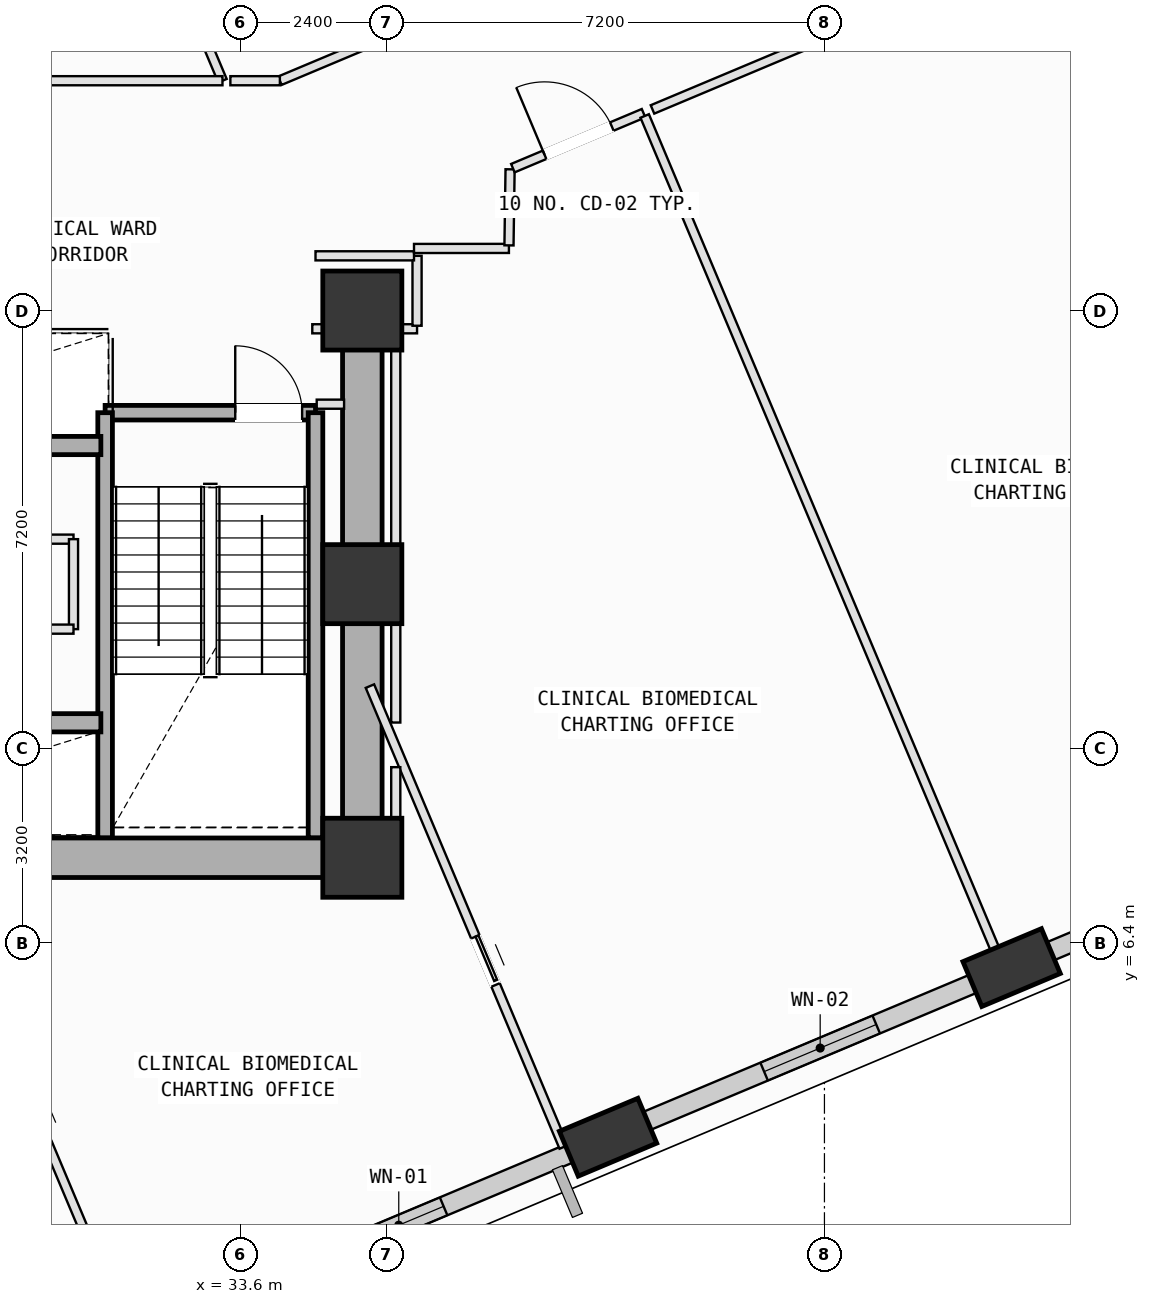
"""IFC4 building model, lengths in metres.
Left out: names, types, materials, properties, quantities, classifications, styles, units other than length and angle.
Written with IfcOpenShell. Run it as: python <this file> out.ifc"""

import sys

from ifc_helpers import new_model, si_unit, direction, frame, frame_2d, origin, origin_2d, place, context, subcontext, project, spatial, rectangle, extrude, element, fill, save


model = new_model("IFC4")
c1 = context("Model", 3, precision=1e-05, world=origin(), true_north=direction((0.0, 1.0)))
c2 = subcontext(c1, "Body", "Model", "MODEL_VIEW")
j1 = project(units=[si_unit("LENGTHUNIT", "METRE"), si_unit("PLANEANGLEUNIT", "RADIAN")], contexts=[c1])
p1 = place(None, origin())
s1 = spatial("IfcSite", under=j1, at=p1, CompositionType="ELEMENT")
p2 = place(p1, origin())
s2 = spatial("IfcBuilding", under=s1, at=p2, CompositionType="ELEMENT")
p3 = place(p2, frame((0.0, 0.0, 120.4)))
s3 = spatial("IfcBuildingStorey", under=s2, at=p3, CompositionType="ELEMENT", Elevation=120.4)
for number, where, z_axis, x_axis in (
    (1, (35.6, 7.8, 0.0), (0.0, 0.0, 1.0), (1.0, 0.0, 0.0)),
    (2, (35.6, 12.3, 0.0), (0.0, 0.0, 1.0), (1.0, 0.0, 0.0)),
    (3, (35.6, 16.8, 0.0), (0.0, 0.0, 1.0), (1.0, 0.0, 0.0)),
):
    element("IfcColumn", number, at=place(p3, frame(where, z_axis=z_axis, x_axis=x_axis)), inside=s3, PredefinedType="COLUMN", context=c2, shape_type="SweptSolid", body=[
        extrude(rectangle(XDim=1.3, YDim=1.3, at=origin_2d()), origin(), (0.0, 0.0, 1.0), 4.0),
    ])
p4 = place(p3, frame((39.641, 3.204, 0.002), z_axis=(0.08893172908, 0.025669760377, 0.995706890086), x_axis=(-0.626372223707, 0.778698418388, 0.035869354176)))
e4 = element("IfcColumn", 4, at=p4, inside=s3, PredefinedType="COLUMN", context=c2, shape_type="SweptSolid", body=[
    extrude(rectangle(XDim=1.4, YDim=0.8, at=origin_2d()), origin(), (0.0, 0.0, 1.0), 4.014),
])
p5 = place(p3, frame((46.279, 5.994, 0.002), z_axis=(0.077184132072, 0.052976658026, 0.995608398649), x_axis=(-0.83977209716, 0.541725725919, 0.036277578595)))
e5 = element("IfcColumn", 5, at=p5, inside=s3, PredefinedType="COLUMN", context=c2, shape_type="SweptSolid", body=[
    extrude(rectangle(XDim=1.4, YDim=0.8, at=origin_2d()), origin(), (0.0, 0.0, 1.0), 4.014),
])
p6 = place(p3, frame((39.354, 3.083, 0.0), z_axis=(0.0, 0.0, 1.0), x_axis=(-0.921860032261, -0.387523006956, 0.0)))
e6 = element("IfcWall", 6, at=p6, inside=s3, PredefinedType="SOLIDWALL", context=c2, shape_type="SweptSolid", body=[
    extrude(rectangle(XDim=6.214, YDim=0.32, at=frame_2d((3.107, 0.0))), origin(), (0.0, 0.0, 1.0), 3.165),
])
p7 = place(p6, frame((2.622, 0.0, 0.75)))
e7 = element("IfcOpeningElement", 7, at=p7, cuts=e6, PredefinedType="OPENING", context=c2, shape_type="SweptSolid", body=[
    extrude(rectangle(XDim=1.6, YDim=1.95, at=frame_2d((0.8, 0.975))), frame((0.0, 0.17, 0.0), z_axis=(0.0, -1.0, 0.0), x_axis=(1.0, 0.0, 0.0)), (0.0, 0.0, 1.0), 0.34),
])
p8 = place(p3, frame((45.992, 5.873, 0.0), z_axis=(0.0, 0.0, 1.0), x_axis=(-0.921868356039, -0.387503205321, 0.0)))
e8 = element("IfcWall", 8, at=p8, inside=s3, PredefinedType="SOLIDWALL", context=c2, shape_type="SweptSolid", body=[
    extrude(rectangle(XDim=6.209, YDim=0.32, at=frame_2d((3.104, 0.0))), origin(), (0.0, 0.0, 1.0), 3.165),
])
p9 = place(p8, frame((2.105, 0.0, 0.75)))
e9 = element("IfcOpeningElement", 9, at=p9, cuts=e8, PredefinedType="OPENING", context=c2, shape_type="SweptSolid", body=[
    extrude(rectangle(XDim=2.0, YDim=1.95, at=frame_2d((1.0, 0.975))), frame((0.0, 0.17, 0.0), z_axis=(0.0, -1.0, 0.0), x_axis=(1.0, 0.0, 0.0)), (0.0, 0.0, 1.0), 0.34),
])
p10 = place(p3, frame((52.637, 8.667, 0.0), z_axis=(0.0, 0.0, 1.0), x_axis=(-0.921850291978, -0.387546176836, 0.0)))
e10 = element("IfcWall", 10, at=p10, inside=s3, PredefinedType="SOLIDWALL", context=c2, shape_type="SweptSolid", body=[
    extrude(rectangle(XDim=6.219, YDim=0.32, at=frame_2d((3.109, 0.0))), origin(), (0.0, 0.0, 1.0), 3.165),
])
p11 = place(p10, frame((2.411, 0.0, 0.75)))
e11 = element("IfcOpeningElement", 11, at=p11, cuts=e10, PredefinedType="OPENING", context=c2, shape_type="SweptSolid", body=[
    extrude(rectangle(XDim=1.4, YDim=1.85, at=frame_2d((0.7, 0.925))), frame((0.0, 0.17, 0.0), z_axis=(0.0, -1.0, 0.0), x_axis=(1.0, 0.0, 0.0)), (0.0, 0.0, 1.0), 0.34),
])
p12 = place(p3, frame((31.37, 15.12, 0.0), z_axis=(0.0, 0.0, 1.0), x_axis=(1.0, 0.0, 0.0)))
e12 = element("IfcWall", 12, at=p12, inside=s3, PredefinedType="SOLIDWALL", context=c2, shape_type="SweptSolid", body=[
    extrude(rectangle(XDim=3.46, YDim=0.24, at=frame_2d((1.73, 0.0))), origin(), (0.0, 0.0, 1.0), 3.78),
])
p13 = place(p12, frame((2.14, 0.0, 0.0)))
e13 = element("IfcOpeningElement", 13, at=p13, cuts=e12, PredefinedType="OPENING", context=c2, shape_type="SweptSolid", body=[
    extrude(rectangle(XDim=1.1, YDim=2.15, at=frame_2d((0.55, 1.075))), frame((0.0, 0.13, 0.0), z_axis=(0.0, -1.0, 0.0), x_axis=(1.0, 0.0, 0.0)), (0.0, 0.0, 1.0), 0.26),
])
for number, where, z_axis, x_axis in (
    (14, (34.83, 15.12, 0.0), (0.0, 0.0, 1.0), (0.0, -1.0, 0.0)),
    (15, (31.37, 8.125, 0.0), (0.0, 0.0, 1.0), (0.0, 1.0, 0.0)),
):
    element("IfcWall", number, at=place(p3, frame(where, z_axis=z_axis, x_axis=x_axis)), inside=s3, PredefinedType="SOLIDWALL", context=c2, shape_type="SweptSolid", body=[
        extrude(rectangle(XDim=6.995, YDim=0.24, at=frame_2d((3.498, 0.0))), origin(), (0.0, 0.0, 1.0), 3.78),
    ])
p14 = place(p3, frame((24.8, 7.8, 0.0), z_axis=(0.0, 0.0, 1.0), x_axis=(1.0, 0.0, 0.0)))
e16 = element("IfcWall", 16, at=p14, inside=s3, PredefinedType="SHEAR", context=c2, shape_type="SweptSolid", body=[
    extrude(rectangle(XDim=10.8, YDim=0.65, at=frame_2d((5.4, 0.0))), origin(), (0.0, 0.0, 1.0), 3.78),
])
p15 = place(p3, frame((35.6, 7.8, 0.0), z_axis=(0.0, 0.0, 1.0), x_axis=(0.0, 1.0, 0.0)))
e17 = element("IfcWall", 17, at=p15, inside=s3, PredefinedType="SHEAR", context=c2, shape_type="SweptSolid", body=[
    extrude(rectangle(XDim=9.0, YDim=0.65, at=frame_2d((4.5, 0.0))), origin(), (0.0, 0.0, 1.0), 3.78),
])
p16 = place(p3, frame((25.85, 10.02, 0.0), z_axis=(0.0, 0.0, 1.0), x_axis=(1.0, 0.0, 0.0)))
e18 = element("IfcWall", 18, at=p16, inside=s3, PredefinedType="SOLIDWALL", context=c2, shape_type="SweptSolid", body=[
    extrude(rectangle(XDim=5.45, YDim=0.3, at=frame_2d((2.725, 0.0))), origin(), (0.0, 0.0, 1.0), 3.78),
])
p17 = place(p16, frame((0.34, 0.0, 0.0)))
e19 = element("IfcOpeningElement", 19, at=p17, cuts=e18, PredefinedType="OPENING", context=c2, shape_type="SweptSolid", body=[
    extrude(rectangle(XDim=1.12, YDim=2.15, at=frame_2d((0.56, 1.075))), frame((0.0, 0.16, 0.0), z_axis=(0.0, -1.0, 0.0), x_axis=(1.0, 0.0, 0.0)), (0.0, 0.0, 1.0), 0.32),
])
p18 = place(p16, frame((2.24, 0.0, 0.0)))
e20 = element("IfcOpeningElement", 20, at=p18, cuts=e18, PredefinedType="OPENING", context=c2, shape_type="SweptSolid", body=[
    extrude(rectangle(XDim=1.12, YDim=2.15, at=frame_2d((0.56, 1.075))), frame((0.0, 0.16, 0.0), z_axis=(0.0, -1.0, 0.0), x_axis=(1.0, 0.0, 0.0)), (0.0, 0.0, 1.0), 0.32),
])
p19 = place(p3, frame((25.85, 14.58, 0.0), z_axis=(0.0, 0.0, 1.0), x_axis=(1.0, 0.0, 0.0)))
e21 = element("IfcWall", 21, at=p19, inside=s3, PredefinedType="SOLIDWALL", context=c2, shape_type="SweptSolid", body=[
    extrude(rectangle(XDim=5.45, YDim=0.3, at=frame_2d((2.725, 0.0))), origin(), (0.0, 0.0, 1.0), 3.78),
])
p20 = place(p3, frame((26.45, 13.04, 0.0), z_axis=(0.0, 0.0, 1.0), x_axis=(1.0, 0.0, 0.0)))
e22 = element("IfcWall", 22, at=p20, inside=s3, PredefinedType="PARTITIONING", context=c2, shape_type="SweptSolid", body=[
    extrude(rectangle(XDim=4.4, YDim=0.15, at=frame_2d((2.2, 0.0))), origin(), (0.0, 0.0, 1.0), 3.78),
])
p21 = place(p20, frame((1.74, 0.0, 0.0)))
e23 = element("IfcOpeningElement", 23, at=p21, cuts=e22, PredefinedType="OPENING", context=c2, shape_type="SweptSolid", body=[
    extrude(rectangle(XDim=0.92, YDim=2.1, at=frame_2d((0.46, 1.05))), frame((0.0, 0.085, 0.0), z_axis=(0.0, -1.0, 0.0), x_axis=(1.0, 0.0, 0.0)), (0.0, 0.0, 1.0), 0.17),
])
p22 = place(p3, frame((30.85, 13.04, 0.0), z_axis=(0.0, 0.0, 1.0), x_axis=(0.0, -1.0, 0.0)))
e24 = element("IfcWall", 24, at=p22, inside=s3, PredefinedType="PARTITIONING", context=c2, shape_type="SweptSolid", body=[
    extrude(rectangle(XDim=1.48, YDim=0.15, at=frame_2d((0.74, 0.0))), origin(), (0.0, 0.0, 1.0), 3.78),
])
p23 = place(p3, frame((30.85, 11.56, 0.0), z_axis=(0.0, 0.0, 1.0), x_axis=(-1.0, 0.0, 0.0)))
e25 = element("IfcWall", 25, at=p23, inside=s3, PredefinedType="PARTITIONING", context=c2, shape_type="SweptSolid", body=[
    extrude(rectangle(XDim=4.4, YDim=0.15, at=frame_2d((2.2, 0.0))), origin(), (0.0, 0.0, 1.0), 3.78),
])
p24 = place(p3, frame((28.512, 7.653, 0.0), z_axis=(0.0, 0.0, 1.0), x_axis=(0.387539276189, -0.921853192982, 0.0)))
e26 = element("IfcWall", 26, at=p24, inside=s3, PredefinedType="PARTITIONING", context=c2, shape_type="SweptSolid", body=[
    extrude(rectangle(XDim=8.645, YDim=0.15, at=frame_2d((4.322, 0.0))), origin(), (0.0, 0.0, 1.0), 3.78),
])
p25 = place(p24, frame((4.055, 0.0, 0.0)))
e27 = element("IfcOpeningElement", 27, at=p25, cuts=e26, PredefinedType="OPENING", context=c2, shape_type="SweptSolid", body=[
    extrude(rectangle(XDim=0.86, YDim=2.06, at=frame_2d((0.43, 1.03))), frame((0.0, 0.085, 0.0), z_axis=(0.0, -1.0, 0.0), x_axis=(1.0, 0.0, 0.0)), (0.0, 0.0, 1.0), 0.17),
])
p26 = place(p3, frame((35.725, 10.623, 0.0), z_axis=(0.0, 0.0, 1.0), x_axis=(0.387581758341, -0.921835332693, 0.0)))
e28 = element("IfcWall", 28, at=p26, inside=s3, PredefinedType="PARTITIONING", context=c2, shape_type="SweptSolid", body=[
    extrude(rectangle(XDim=8.223, YDim=0.15, at=frame_2d((4.111, 0.0))), origin(), (0.0, 0.0, 1.0), 3.78),
])
p27 = place(p26, frame((4.472, 0.0, 0.0)))
e29 = element("IfcOpeningElement", 29, at=p27, cuts=e28, PredefinedType="OPENING", context=c2, shape_type="SweptSolid", body=[
    extrude(rectangle(XDim=0.86, YDim=2.06, at=frame_2d((0.43, 1.03))), frame((0.0, 0.085, 0.0), z_axis=(0.0, -1.0, 0.0), x_axis=(1.0, 0.0, 0.0)), (0.0, 0.0, 1.0), 0.17),
])
p28 = place(p3, frame((35.6, 7.5, 0.0), z_axis=(0.0, 0.0, 1.0), x_axis=(1.0, 0.0, 0.0)))
e30 = element("IfcWall", 30, at=p28, inside=s3, PredefinedType="PARTITIONING", context=c2, shape_type="SweptSolid", body=[
    extrude(rectangle(XDim=0.55, YDim=0.15, at=frame_2d((0.275, 0.0))), origin(), (0.0, 0.0, 1.0), 2.965),
])
p29 = place(p3, frame((36.15, 7.5, 0.0), z_axis=(0.0, 0.0, 1.0), x_axis=(0.0, 1.0, 0.0)))
e31 = element("IfcWall", 31, at=p29, inside=s3, PredefinedType="PARTITIONING", context=c2, shape_type="SweptSolid", body=[
    extrude(rectangle(XDim=1.79, YDim=0.15, at=frame_2d((0.895, 0.0))), origin(), (0.0, 0.0, 1.0), 3.78),
])
p30 = place(p3, frame((34.777, 16.5, 0.0), z_axis=(0.0, 0.0, 1.0), x_axis=(1.0, 0.0, 0.0)))
e32 = element("IfcWall", 32, at=p30, inside=s3, PredefinedType="PARTITIONING", context=c2, shape_type="SweptSolid", body=[
    extrude(rectangle(XDim=0.523, YDim=0.15, at=frame_2d((0.261, 0.0))), origin(), (0.0, 0.0, 1.0), 2.965),
])
p31 = place(p3, frame((35.9, 16.5, 0.0), z_axis=(0.0, 0.0, 1.0), x_axis=(1.0, 0.0, 0.0)))
e33 = element("IfcWall", 33, at=p31, inside=s3, PredefinedType="PARTITIONING", context=c2, shape_type="SweptSolid", body=[
    extrude(rectangle(XDim=0.6, YDim=0.15, at=frame_2d((0.3, 0.0))), origin(), (0.0, 0.0, 1.0), 2.965),
])
p32 = place(p3, frame((36.5, 16.55, 0.0), z_axis=(0.0, 0.0, 1.0), x_axis=(0.0, 1.0, 0.0)))
e34 = element("IfcWall", 34, at=p32, inside=s3, PredefinedType="PARTITIONING", context=c2, shape_type="SweptSolid", body=[
    extrude(rectangle(XDim=1.15, YDim=0.15, at=frame_2d((0.575, 0.0))), origin(), (0.0, 0.0, 1.0), 3.78),
])
p33 = place(p3, frame((36.45, 17.7, 0.0), z_axis=(0.0, 0.0, 1.0), x_axis=(-1.0, 0.0, 0.0)))
e35 = element("IfcWall", 35, at=p33, inside=s3, PredefinedType="PARTITIONING", context=c2, shape_type="SweptSolid", body=[
    extrude(rectangle(XDim=1.62, YDim=0.15, at=frame_2d((0.81, 0.0))), origin(), (0.0, 0.0, 1.0), 3.78),
])
p34 = place(p3, frame((36.45, 17.821, 0.0), z_axis=(0.0, 0.0, 1.0), x_axis=(0.999999804321, 0.000625586365, 0.0)))
e36 = element("IfcWall", 36, at=p34, inside=s3, PredefinedType="PARTITIONING", context=c2, shape_type="SweptSolid", body=[
    extrude(rectangle(XDim=1.561, YDim=0.15, at=frame_2d((0.781, 0.0))), origin(), (0.0, 0.0, 1.0), 2.965),
])
p35 = place(p3, frame((38.012, 17.872, 0.0), z_axis=(0.0, 0.0, 1.0), x_axis=(0.014440336502, 0.999895732905, 0.0)))
e37 = element("IfcWall", 37, at=p35, inside=s3, PredefinedType="PARTITIONING", context=c2, shape_type="SweptSolid", body=[
    extrude(rectangle(XDim=1.251, YDim=0.15, at=frame_2d((0.625, 0.0))), origin(), (0.0, 0.0, 1.0), 3.78),
])
p36 = place(p3, frame((38.076, 19.142, 0.0), z_axis=(0.0, 0.0, 1.0), x_axis=(0.921804802064, 0.387654365244, 0.0)))
e38 = element("IfcWall", 38, at=p36, inside=s3, PredefinedType="PARTITIONING", context=c2, shape_type="SweptSolid", body=[
    extrude(rectangle(XDim=2.332, YDim=0.15, at=frame_2d((1.166, 0.0))), origin(), (0.0, 0.0, 1.0), 2.945),
])
p37 = place(p36, frame((0.566, 0.0, 0.0)))
e39 = element("IfcOpeningElement", 39, at=p37, cuts=e38, PredefinedType="OPENING", context=c2, shape_type="SweptSolid", body=[
    extrude(rectangle(XDim=1.2, YDim=2.15, at=frame_2d((0.6, 1.075))), frame((0.0, 0.085, 0.0), z_axis=(0.0, -1.0, 0.0), x_axis=(1.0, 0.0, 0.0)), (0.0, 0.0, 1.0), 0.17),
])
p38 = place(p3, frame((40.244, 20.0, 0.0), z_axis=(0.0, 0.0, 1.0), x_axis=(0.387518279995, -0.921862019323, 0.0)))
e40 = element("IfcWall", 40, at=p38, inside=s3, PredefinedType="PARTITIONING", context=c2, shape_type="SweptSolid", body=[
    extrude(rectangle(XDim=15.481, YDim=0.15, at=frame_2d((7.74, 0.0))), origin(), (0.0, 0.0, 1.0), 3.78),
])
p39 = place(p3, frame((40.357, 3.255, 0.0), z_axis=(0.0, 0.0, 1.0), x_axis=(-0.921987382079, -0.387219921087, 0.0)))
e41 = element("IfcWall", 41, at=p39, inside=s3, PredefinedType="PARTITIONING", context=c2, shape_type="SweptSolid", body=[
    extrude(rectangle(XDim=0.991, YDim=0.15, at=frame_2d((0.496, 0.0))), origin(), (0.0, 0.0, 1.0), 3.165),
])
p40 = place(p3, frame((36.15, 10.024, 0.0), z_axis=(0.0, 0.0, 1.0), x_axis=(0.0, 1.0, 0.0)))
e42 = element("IfcWall", 42, at=p40, inside=s3, PredefinedType="PARTITIONING", context=c2, shape_type="SweptSolid", body=[
    extrude(rectangle(XDim=6.316, YDim=0.15, at=frame_2d((3.158, 0.0))), origin(), (0.0, 0.0, 1.0), 3.78),
])
p41 = place(p3, frame((35.3, 15.26, 0.0), z_axis=(0.0, 0.0, 1.0), x_axis=(-1.0, 0.0, 0.0)))
e43 = element("IfcWall", 43, at=p41, inside=s3, PredefinedType="PARTITIONING", context=c2, shape_type="SweptSolid", body=[
    extrude(rectangle(XDim=0.45, YDim=0.15, at=frame_2d((0.225, 0.0))), origin(), (0.0, 0.0, 1.0), 3.78),
])
p42 = place(p3, frame((40.372, 20.108, 0.0), z_axis=(0.0, 0.0, 1.0), x_axis=(0.921900405163, 0.387426951774, 0.0)))
e44 = element("IfcWall", 44, at=p42, inside=s3, PredefinedType="PARTITIONING", context=c2, shape_type="SweptSolid", body=[
    extrude(rectangle(XDim=7.641, YDim=0.15, at=frame_2d((3.82, 0.0))), origin(), (0.0, 0.0, 1.0), 3.78),
])
p43 = place(p42, frame((3.22, 0.0, 0.0)))
e45 = element("IfcOpeningElement", 45, at=p43, cuts=e44, PredefinedType="OPENING", context=c2, shape_type="SweptSolid", body=[
    extrude(rectangle(XDim=1.2, YDim=2.15, at=frame_2d((0.6, 1.075))), frame((0.0, 0.085, 0.0), z_axis=(0.0, -1.0, 0.0), x_axis=(1.0, 0.0, 0.0)), (0.0, 0.0, 1.0), 0.17),
])
p44 = place(p3, frame((46.994, 6.044, 0.0), z_axis=(0.0, 0.0, 1.0), x_axis=(-0.922112725335, -0.386921337969, 0.0)))
e46 = element("IfcWall", 46, at=p44, inside=s3, PredefinedType="PARTITIONING", context=c2, shape_type="SweptSolid", body=[
    extrude(rectangle(XDim=0.654, YDim=0.15, at=frame_2d((0.327, 0.0))), origin(), (0.0, 0.0, 1.0), 3.165),
])
p45 = place(p3, frame((32.413, 22.69, 0.0), z_axis=(0.0, 0.0, 1.0), x_axis=(0.387537134963, -0.921854093132, 0.0)))
e47 = element("IfcWall", 47, at=p45, inside=s3, PredefinedType="PARTITIONING", context=c2, shape_type="SweptSolid", body=[
    extrude(rectangle(XDim=2.289, YDim=0.15, at=frame_2d((1.145, 0.0))), origin(), (0.0, 0.0, 1.0), 3.78),
])
p46 = place(p3, frame((33.3, 20.58, 0.0), z_axis=(0.0, 0.0, 1.0), x_axis=(-1.0, 0.0, 0.0)))
e48 = element("IfcWall", 48, at=p46, inside=s3, PredefinedType="PARTITIONING", context=c2, shape_type="SweptSolid", body=[
    extrude(rectangle(XDim=4.495, YDim=0.15, at=frame_2d((2.248, 0.0))), origin(), (0.0, 0.0, 1.0), 3.78),
])
p47 = place(p3, frame((44.851, 25.038, 0.0), z_axis=(0.0, 0.0, 1.0), x_axis=(-0.921889203051, -0.38745360664, 0.0)))
e49 = element("IfcWall", 49, at=p47, inside=s3, PredefinedType="PARTITIONING", context=c2, shape_type="SweptSolid", body=[
    extrude(rectangle(XDim=11.506, YDim=0.15, at=frame_2d((5.753, 0.0))), origin(), (0.0, 0.0, 1.0), 2.945),
])
p48 = place(p47, frame((5.153, 0.0, 0.0)))
e50 = element("IfcOpeningElement", 50, at=p48, cuts=e49, PredefinedType="OPENING", context=c2, shape_type="SweptSolid", body=[
    extrude(rectangle(XDim=1.2, YDim=2.15, at=frame_2d((0.6, 1.075))), frame((0.0, 0.085, 0.0), z_axis=(0.0, -1.0, 0.0), x_axis=(1.0, 0.0, 0.0)), (0.0, 0.0, 1.0), 0.17),
])
p49 = place(p3, frame((34.244, 20.58, 0.0), z_axis=(0.0, 0.0, 1.0), x_axis=(-1.0, 0.0, 0.0)))
e51 = element("IfcWall", 51, at=p49, inside=s3, PredefinedType="PARTITIONING", context=c2, shape_type="SweptSolid", body=[
    extrude(rectangle(XDim=0.814, YDim=0.15, at=frame_2d((0.407, 0.0))), origin(), (0.0, 0.0, 1.0), 3.78),
])
p50 = place(p7, origin())
e52 = element("IfcWindow", 52, at=p50, inside=s3, PartitioningType="SINGLE_PANEL", PredefinedType="WINDOW", context=c2, shape_type="SweptSolid", body=[
    extrude(rectangle(XDim=1.6, YDim=1.95, at=frame_2d((0.8, 0.975))), frame((0.0, 0.03, 0.0), z_axis=(0.0, -1.0, 0.0), x_axis=(1.0, 0.0, 0.0)), (0.0, 0.0, 1.0), 0.06),
])
fill(e7, e52)
p51 = place(p9, origin())
e53 = element("IfcWindow", 53, at=p51, inside=s3, PartitioningType="SINGLE_PANEL", PredefinedType="WINDOW", context=c2, shape_type="SweptSolid", body=[
    extrude(rectangle(XDim=2.0, YDim=1.95, at=frame_2d((1.0, 0.975))), frame((0.0, 0.03, 0.0), z_axis=(0.0, -1.0, 0.0), x_axis=(1.0, 0.0, 0.0)), (0.0, 0.0, 1.0), 0.06),
])
fill(e9, e53)
p52 = place(p13, origin())
e54 = element("IfcDoor", 54, at=p52, inside=s3, OperationType="SINGLE_SWING_LEFT", PredefinedType="DOOR", context=c2, shape_type="SweptSolid", body=[
    extrude(rectangle(XDim=1.1, YDim=2.15, at=frame_2d((0.55, 1.075))), frame((0.0, 0.025, 0.0), z_axis=(0.0, -1.0, 0.0), x_axis=(1.0, 0.0, 0.0)), (0.0, 0.0, 1.0), 0.05),
])
fill(e13, e54)
p53 = place(p37, origin())
e55 = element("IfcDoor", 55, at=p53, inside=s3, OperationType="SINGLE_SWING_LEFT", PredefinedType="DOOR", context=c2, shape_type="SweptSolid", body=[
    extrude(rectangle(XDim=1.2, YDim=2.15, at=frame_2d((0.6, 1.075))), frame((0.0, 0.025, 0.0), z_axis=(0.0, -1.0, 0.0), x_axis=(1.0, 0.0, 0.0)), (0.0, 0.0, 1.0), 0.05),
])
fill(e39, e55)
p54 = place(p27, origin())
e56 = element("IfcDoor", 56, at=p54, inside=s3, OperationType="SLIDING_TO_LEFT", PredefinedType="DOOR", context=c2, shape_type="SweptSolid", body=[
    extrude(rectangle(XDim=0.86, YDim=2.06, at=frame_2d((0.43, 1.03))), frame((0.0, 0.025, 0.0), z_axis=(0.0, -1.0, 0.0), x_axis=(1.0, 0.0, 0.0)), (0.0, 0.0, 1.0), 0.05),
])
fill(e29, e56)
save(model, sys.argv[1])
